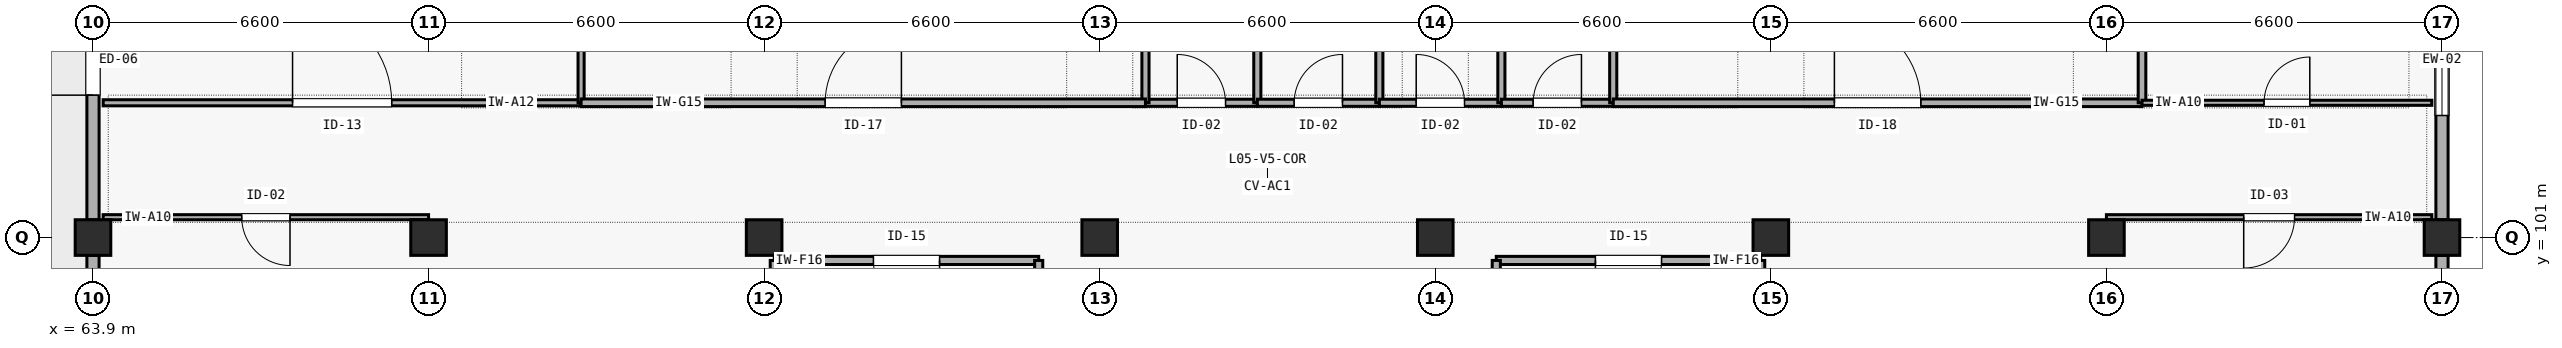
"""IFC4 building model, lengths in metres.
Left out: names, types, materials, properties, quantities, classifications, styles, units other than length and angle.
Written with IfcOpenShell. Run it as: python <this file> out.ifc"""

import sys

from ifc_helpers import new_model, si_unit, direction, frame, frame_2d, origin, origin_2d, place, context, subcontext, project, spatial, rectangle, extrude, element, fill, save


model = new_model("IFC4")
c1 = context("Model", 3, precision=1e-05, world=origin(), true_north=direction((0.0, 1.0)))
c2 = subcontext(c1, "Body", "Model", "MODEL_VIEW")
j1 = project(units=[si_unit("LENGTHUNIT", "METRE"), si_unit("PLANEANGLEUNIT", "RADIAN")], contexts=[c1])
p1 = place(None, origin())
s1 = spatial("IfcSite", under=j1, at=p1, CompositionType="ELEMENT")
p2 = place(p1, origin())
s2 = spatial("IfcBuilding", under=s1, at=p2, CompositionType="ELEMENT")
p3 = place(p2, frame((0.0, 0.0, 21.0)))
s3 = spatial("IfcBuildingStorey", under=s2, at=p3, CompositionType="ELEMENT", Elevation=21.0)
for number, where, z_axis, x_axis in (
    (1, (63.9, 101.0, 0.0), (0.0, 0.0, 1.0), (1.0, 0.0, 0.0)),
    (2, (70.5, 101.0, 0.0), (0.0, 0.0, 1.0), (1.0, 0.0, 0.0)),
    (3, (77.1, 101.0, 0.0), (0.0, 0.0, 1.0), (1.0, 0.0, 0.0)),
    (4, (83.7, 101.0, 0.0), (0.0, 0.0, 1.0), (1.0, 0.0, 0.0)),
    (5, (90.3, 101.0, 0.0), (0.0, 0.0, 1.0), (1.0, 0.0, 0.0)),
    (6, (96.9, 101.0, 0.0), (0.0, 0.0, 1.0), (1.0, 0.0, 0.0)),
    (7, (103.5, 101.0, 0.0), (0.0, 0.0, 1.0), (1.0, 0.0, 0.0)),
    (8, (110.1, 101.0, 0.0), (0.0, 0.0, 1.0), (1.0, 0.0, 0.0)),
):
    element("IfcColumn", number, at=place(p3, frame(where, z_axis=z_axis, x_axis=x_axis)), inside=s3, PredefinedType="COLUMN", context=c2, shape_type="SweptSolid", body=[
        extrude(rectangle(XDim=0.7, YDim=0.7, at=origin_2d()), origin(), (0.0, 0.0, 1.0), 4.2),
    ])
p4 = place(p3, frame((63.9, 94.35, 0.0), z_axis=(0.0, 0.0, 1.0), x_axis=(0.0, 1.0, 0.0)))
e9 = element("IfcWall", 9, at=p4, inside=s3, PredefinedType="SOLIDWALL", context=c2, shape_type="SweptSolid", body=[
    extrude(rectangle(XDim=6.3, YDim=0.24, at=frame_2d((3.15, 0.0))), origin(), (0.0, 0.0, 1.0), 3.505),
])
p5 = place(p4, frame((1.8, 0.0, 0.85)))
e10 = element("IfcOpeningElement", 10, at=p5, cuts=e9, PredefinedType="OPENING", context=c2, shape_type="SweptSolid", body=[
    extrude(rectangle(XDim=2.7, YDim=1.6, at=frame_2d((1.35, 0.8))), frame((0.0, 0.13, 0.0), z_axis=(0.0, -1.0, 0.0), x_axis=(1.0, 0.0, 0.0)), (0.0, 0.0, 1.0), 0.26),
])
p6 = place(p3, frame((63.9, 101.35, 0.0), z_axis=(0.0, 0.0, 1.0), x_axis=(0.0, 1.0, 0.0)))
e11 = element("IfcWall", 11, at=p6, inside=s3, PredefinedType="SOLIDWALL", context=c2, shape_type="SweptSolid", body=[
    extrude(rectangle(XDim=6.3, YDim=0.24, at=frame_2d((3.15, 0.0))), origin(), (0.0, 0.0, 1.0), 3.505),
])
p7 = place(p6, frame((2.45, 0.0, 0.0)))
e12 = element("IfcOpeningElement", 12, at=p7, cuts=e11, PredefinedType="OPENING", context=c2, shape_type="SweptSolid", body=[
    extrude(rectangle(XDim=1.4, YDim=2.15, at=frame_2d((0.7, 1.075))), frame((0.0, 0.13, 0.0), z_axis=(0.0, -1.0, 0.0), x_axis=(1.0, 0.0, 0.0)), (0.0, 0.0, 1.0), 0.26),
])
p8 = place(p3, frame((110.1, 94.35, 0.0), z_axis=(0.0, 0.0, 1.0), x_axis=(0.0, 1.0, 0.0)))
e13 = element("IfcWall", 13, at=p8, inside=s3, PredefinedType="SOLIDWALL", context=c2, shape_type="SweptSolid", body=[
    extrude(rectangle(XDim=6.3, YDim=0.24, at=frame_2d((3.15, 0.0))), origin(), (0.0, 0.0, 1.0), 3.465),
])
p9 = place(p8, frame((2.35, 0.0, 0.85)))
e14 = element("IfcOpeningElement", 14, at=p9, cuts=e13, PredefinedType="OPENING", context=c2, shape_type="SweptSolid", body=[
    extrude(rectangle(XDim=1.6, YDim=1.45, at=frame_2d((0.8, 0.725))), frame((0.0, 0.13, 0.0), z_axis=(0.0, -1.0, 0.0), x_axis=(1.0, 0.0, 0.0)), (0.0, 0.0, 1.0), 0.26),
])
p10 = place(p3, frame((110.1, 101.35, 0.0), z_axis=(0.0, 0.0, 1.0), x_axis=(0.0, 1.0, 0.0)))
e15 = element("IfcWall", 15, at=p10, inside=s3, PredefinedType="SOLIDWALL", context=c2, shape_type="SweptSolid", body=[
    extrude(rectangle(XDim=6.3, YDim=0.24, at=frame_2d((3.15, 0.0))), origin(), (0.0, 0.0, 1.0), 3.465),
])
p11 = place(p10, frame((2.05, 0.0, 0.85)))
e16 = element("IfcOpeningElement", 16, at=p11, cuts=e15, PredefinedType="OPENING", context=c2, shape_type="SweptSolid", body=[
    extrude(rectangle(XDim=2.2, YDim=1.2, at=frame_2d((1.1, 0.6))), frame((0.0, 0.13, 0.0), z_axis=(0.0, -1.0, 0.0), x_axis=(1.0, 0.0, 0.0)), (0.0, 0.0, 1.0), 0.26),
])
p12 = place(p3, frame((77.3, 100.55, 0.0), z_axis=(0.0, 0.0, 1.0), x_axis=(1.0, 0.0, 0.0)))
e17 = element("IfcWall", 17, at=p12, inside=s3, PredefinedType="SOLIDWALL", context=c2, shape_type="SweptSolid", body=[
    extrude(rectangle(XDim=5.2, YDim=0.16, at=frame_2d((2.6, 0.0))), origin(), (0.0, 0.0, 1.0), 3.9),
])
p13 = place(p12, frame((1.95, 0.0, 0.0)))
e18 = element("IfcOpeningElement", 18, at=p13, cuts=e17, PredefinedType="OPENING", context=c2, shape_type="SweptSolid", body=[
    extrude(rectangle(XDim=1.3, YDim=2.15, at=frame_2d((0.65, 1.075))), frame((0.0, 0.09, 0.0), z_axis=(0.0, -1.0, 0.0), x_axis=(1.0, 0.0, 0.0)), (0.0, 0.0, 1.0), 0.18),
])
p14 = place(p3, frame((77.3, 97.5, 0.0), z_axis=(0.0, 0.0, 1.0), x_axis=(0.0, 1.0, 0.0)))
e19 = element("IfcWall", 19, at=p14, inside=s3, PredefinedType="SOLIDWALL", context=c2, shape_type="SweptSolid", body=[
    extrude(rectangle(XDim=3.05, YDim=0.16, at=frame_2d((1.525, 0.0))), origin(), (0.0, 0.0, 1.0), 3.405),
])
p15 = place(p3, frame((82.5, 97.5, 0.0), z_axis=(0.0, 0.0, 1.0), x_axis=(0.0, 1.0, 0.0)))
e20 = element("IfcWall", 20, at=p15, inside=s3, PredefinedType="SOLIDWALL", context=c2, shape_type="SweptSolid", body=[
    extrude(rectangle(XDim=3.05, YDim=0.16, at=frame_2d((1.525, 0.0))), origin(), (0.0, 0.0, 1.0), 3.9),
])
p16 = place(p3, frame((91.5, 100.55, 0.0), z_axis=(0.0, 0.0, 1.0), x_axis=(1.0, 0.0, 0.0)))
e21 = element("IfcWall", 21, at=p16, inside=s3, PredefinedType="SOLIDWALL", context=c2, shape_type="SweptSolid", body=[
    extrude(rectangle(XDim=5.2, YDim=0.16, at=frame_2d((2.6, 0.0))), origin(), (0.0, 0.0, 1.0), 3.9),
])
p17 = place(p16, frame((1.95, 0.0, 0.0)))
e22 = element("IfcOpeningElement", 22, at=p17, cuts=e21, PredefinedType="OPENING", context=c2, shape_type="SweptSolid", body=[
    extrude(rectangle(XDim=1.3, YDim=2.15, at=frame_2d((0.65, 1.075))), frame((0.0, 0.09, 0.0), z_axis=(0.0, -1.0, 0.0), x_axis=(1.0, 0.0, 0.0)), (0.0, 0.0, 1.0), 0.18),
])
p18 = place(p3, frame((91.5, 97.5, 0.0), z_axis=(0.0, 0.0, 1.0), x_axis=(0.0, 1.0, 0.0)))
e23 = element("IfcWall", 23, at=p18, inside=s3, PredefinedType="SOLIDWALL", context=c2, shape_type="SweptSolid", body=[
    extrude(rectangle(XDim=3.05, YDim=0.16, at=frame_2d((1.525, 0.0))), origin(), (0.0, 0.0, 1.0), 3.9),
])
p19 = place(p3, frame((96.7, 97.5, 0.0), z_axis=(0.0, 0.0, 1.0), x_axis=(0.0, 1.0, 0.0)))
e24 = element("IfcWall", 24, at=p19, inside=s3, PredefinedType="SOLIDWALL", context=c2, shape_type="SweptSolid", body=[
    extrude(rectangle(XDim=3.05, YDim=0.16, at=frame_2d((1.525, 0.0))), origin(), (0.0, 0.0, 1.0), 3.405),
])
p20 = place(p3, frame((84.6, 103.65, 0.0), z_axis=(0.0, 0.0, 1.0), x_axis=(1.0, 0.0, 0.0)))
e25 = element("IfcWall", 25, at=p20, inside=s3, PredefinedType="PLUMBINGWALL", context=c2, shape_type="SweptSolid", body=[
    extrude(rectangle(XDim=2.2, YDim=0.14, at=frame_2d((1.1, 0.0))), origin(), (0.0, 0.0, 1.0), 3.9),
])
p21 = place(p20, frame((0.625, 0.0, 0.0)))
e26 = element("IfcOpeningElement", 26, at=p21, cuts=e25, PredefinedType="OPENING", context=c2, shape_type="SweptSolid", body=[
    extrude(rectangle(XDim=0.95, YDim=2.1, at=frame_2d((0.475, 1.05))), frame((0.0, 0.08, 0.0), z_axis=(0.0, -1.0, 0.0), x_axis=(1.0, 0.0, 0.0)), (0.0, 0.0, 1.0), 0.16),
])
for number, where, z_axis, x_axis in (
    (27, (84.6, 103.65, 0.0), (0.0, 0.0, 1.0), (0.0, 1.0, 0.0)),
    (28, (86.8, 103.65, 0.0), (0.0, 0.0, 1.0), (0.0, 1.0, 0.0)),
):
    element("IfcWall", number, at=place(p3, frame(where, z_axis=z_axis, x_axis=x_axis)), inside=s3, PredefinedType="PLUMBINGWALL", context=c2, shape_type="SweptSolid", body=[
        extrude(rectangle(XDim=4.15, YDim=0.14, at=frame_2d((2.075, 0.0))), origin(), (0.0, 0.0, 1.0), 3.9),
    ])
p22 = place(p3, frame((86.8, 103.65, 0.0), z_axis=(0.0, 0.0, 1.0), x_axis=(1.0, 0.0, 0.0)))
e29 = element("IfcWall", 29, at=p22, inside=s3, PredefinedType="PLUMBINGWALL", context=c2, shape_type="SweptSolid", body=[
    extrude(rectangle(XDim=2.4, YDim=0.14, at=frame_2d((1.2, 0.0))), origin(), (0.0, 0.0, 1.0), 3.9),
])
p23 = place(p22, frame((0.725, 0.0, 0.0)))
e30 = element("IfcOpeningElement", 30, at=p23, cuts=e29, PredefinedType="OPENING", context=c2, shape_type="SweptSolid", body=[
    extrude(rectangle(XDim=0.95, YDim=2.1, at=frame_2d((0.475, 1.05))), frame((0.0, 0.08, 0.0), z_axis=(0.0, -1.0, 0.0), x_axis=(1.0, 0.0, 0.0)), (0.0, 0.0, 1.0), 0.16),
])
p24 = place(p3, frame((89.2, 103.65, 0.0), z_axis=(0.0, 0.0, 1.0), x_axis=(0.0, 1.0, 0.0)))
e31 = element("IfcWall", 31, at=p24, inside=s3, PredefinedType="PLUMBINGWALL", context=c2, shape_type="SweptSolid", body=[
    extrude(rectangle(XDim=4.15, YDim=0.14, at=frame_2d((2.075, 0.0))), origin(), (0.0, 0.0, 1.0), 3.9),
])
p25 = place(p3, frame((89.2, 103.65, 0.0), z_axis=(0.0, 0.0, 1.0), x_axis=(1.0, 0.0, 0.0)))
e32 = element("IfcWall", 32, at=p25, inside=s3, PredefinedType="PLUMBINGWALL", context=c2, shape_type="SweptSolid", body=[
    extrude(rectangle(XDim=2.4, YDim=0.14, at=frame_2d((1.2, 0.0))), origin(), (0.0, 0.0, 1.0), 3.9),
])
p26 = place(p25, frame((0.725, 0.0, 0.0)))
e33 = element("IfcOpeningElement", 33, at=p26, cuts=e32, PredefinedType="OPENING", context=c2, shape_type="SweptSolid", body=[
    extrude(rectangle(XDim=0.95, YDim=2.1, at=frame_2d((0.475, 1.05))), frame((0.0, 0.08, 0.0), z_axis=(0.0, -1.0, 0.0), x_axis=(1.0, 0.0, 0.0)), (0.0, 0.0, 1.0), 0.16),
])
p27 = place(p3, frame((91.6, 103.65, 0.0), z_axis=(0.0, 0.0, 1.0), x_axis=(0.0, 1.0, 0.0)))
e34 = element("IfcWall", 34, at=p27, inside=s3, PredefinedType="PLUMBINGWALL", context=c2, shape_type="SweptSolid", body=[
    extrude(rectangle(XDim=4.15, YDim=0.14, at=frame_2d((2.075, 0.0))), origin(), (0.0, 0.0, 1.0), 3.9),
])
p28 = place(p3, frame((91.6, 103.65, 0.0), z_axis=(0.0, 0.0, 1.0), x_axis=(1.0, 0.0, 0.0)))
e35 = element("IfcWall", 35, at=p28, inside=s3, PredefinedType="PLUMBINGWALL", context=c2, shape_type="SweptSolid", body=[
    extrude(rectangle(XDim=2.2, YDim=0.14, at=frame_2d((1.1, 0.0))), origin(), (0.0, 0.0, 1.0), 3.9),
])
p29 = place(p28, frame((0.625, 0.0, 0.0)))
e36 = element("IfcOpeningElement", 36, at=p29, cuts=e35, PredefinedType="OPENING", context=c2, shape_type="SweptSolid", body=[
    extrude(rectangle(XDim=0.95, YDim=2.1, at=frame_2d((0.475, 1.05))), frame((0.0, 0.08, 0.0), z_axis=(0.0, -1.0, 0.0), x_axis=(1.0, 0.0, 0.0)), (0.0, 0.0, 1.0), 0.16),
])
p30 = place(p3, frame((93.8, 103.65, 0.0), z_axis=(0.0, 0.0, 1.0), x_axis=(0.0, 1.0, 0.0)))
e37 = element("IfcWall", 37, at=p30, inside=s3, PredefinedType="PLUMBINGWALL", context=c2, shape_type="SweptSolid", body=[
    extrude(rectangle(XDim=4.15, YDim=0.14, at=frame_2d((2.075, 0.0))), origin(), (0.0, 0.0, 1.0), 3.9),
])
p31 = place(p3, frame((64.1, 103.65, 0.0), z_axis=(0.0, 0.0, 1.0), x_axis=(1.0, 0.0, 0.0)))
e38 = element("IfcWall", 38, at=p31, inside=s3, PredefinedType="PARTITIONING", context=c2, shape_type="SweptSolid", body=[
    extrude(rectangle(XDim=9.4, YDim=0.12, at=frame_2d((4.7, 0.0))), origin(), (0.0, 0.0, 1.0), 3.9),
])
p32 = place(p31, frame((3.725, 0.0, 0.0)))
e39 = element("IfcOpeningElement", 39, at=p32, cuts=e38, PredefinedType="OPENING", context=c2, shape_type="SweptSolid", body=[
    extrude(rectangle(XDim=1.95, YDim=2.3, at=frame_2d((0.975, 1.15))), frame((0.0, 0.07, 0.0), z_axis=(0.0, -1.0, 0.0), x_axis=(1.0, 0.0, 0.0)), (0.0, 0.0, 1.0), 0.14),
])
p33 = place(p3, frame((73.5, 103.65, 0.0), z_axis=(0.0, 0.0, 1.0), x_axis=(0.0, 1.0, 0.0)))
e40 = element("IfcWall", 40, at=p33, inside=s3, PredefinedType="PARTITIONING", context=c2, shape_type="SweptSolid", body=[
    extrude(rectangle(XDim=11.15, YDim=0.12, at=frame_2d((5.575, 0.0))), origin(), (0.0, 0.0, 1.0), 3.9),
])
p34 = place(p3, frame((73.5, 103.65, 0.0), z_axis=(0.0, 0.0, 1.0), x_axis=(1.0, 0.0, 0.0)))
e41 = element("IfcWall", 41, at=p34, inside=s3, PredefinedType="PARTITIONING", context=c2, shape_type="SweptSolid", body=[
    extrude(rectangle(XDim=11.1, YDim=0.15, at=frame_2d((5.55, 0.0))), origin(), (0.0, 0.0, 1.0), 3.9),
])
p35 = place(p34, frame((4.8, 0.0, 0.0)))
e42 = element("IfcOpeningElement", 42, at=p35, cuts=e41, PredefinedType="OPENING", context=c2, shape_type="SweptSolid", body=[
    extrude(rectangle(XDim=1.5, YDim=2.15, at=frame_2d((0.75, 1.075))), frame((0.0, 0.085, 0.0), z_axis=(0.0, -1.0, 0.0), x_axis=(1.0, 0.0, 0.0)), (0.0, 0.0, 1.0), 0.17),
])
p36 = place(p3, frame((93.8, 103.65, 0.0), z_axis=(0.0, 0.0, 1.0), x_axis=(1.0, 0.0, 0.0)))
e43 = element("IfcWall", 43, at=p36, inside=s3, PredefinedType="PARTITIONING", context=c2, shape_type="SweptSolid", body=[
    extrude(rectangle(XDim=10.4, YDim=0.15, at=frame_2d((5.2, 0.0))), origin(), (0.0, 0.0, 1.0), 3.9),
])
p37 = place(p36, frame((4.35, 0.0, 0.0)))
e44 = element("IfcOpeningElement", 44, at=p37, cuts=e43, PredefinedType="OPENING", context=c2, shape_type="SweptSolid", body=[
    extrude(rectangle(XDim=1.7, YDim=2.2, at=frame_2d((0.85, 1.1))), frame((0.0, 0.085, 0.0), z_axis=(0.0, -1.0, 0.0), x_axis=(1.0, 0.0, 0.0)), (0.0, 0.0, 1.0), 0.17),
])
p38 = place(p3, frame((104.2, 103.65, 0.0), z_axis=(0.0, 0.0, 1.0), x_axis=(0.0, 1.0, 0.0)))
e45 = element("IfcWall", 45, at=p38, inside=s3, PredefinedType="PARTITIONING", context=c2, shape_type="SweptSolid", body=[
    extrude(rectangle(XDim=11.15, YDim=0.15, at=frame_2d((5.575, 0.0))), origin(), (0.0, 0.0, 1.0), 3.9),
])
p39 = place(p3, frame((104.2, 103.65, 0.0), z_axis=(0.0, 0.0, 1.0), x_axis=(1.0, 0.0, 0.0)))
e46 = element("IfcWall", 46, at=p39, inside=s3, PredefinedType="PARTITIONING", context=c2, shape_type="SweptSolid", body=[
    extrude(rectangle(XDim=5.7, YDim=0.1, at=frame_2d((2.85, 0.0))), origin(), (0.0, 0.0, 1.0), 3.9),
])
p40 = place(p39, frame((2.4, 0.0, 0.0)))
e47 = element("IfcOpeningElement", 47, at=p40, cuts=e46, PredefinedType="OPENING", context=c2, shape_type="SweptSolid", body=[
    extrude(rectangle(XDim=0.9, YDim=2.1, at=frame_2d((0.45, 1.05))), frame((0.0, 0.06, 0.0), z_axis=(0.0, -1.0, 0.0), x_axis=(1.0, 0.0, 0.0)), (0.0, 0.0, 1.0), 0.12),
])
p41 = place(p3, frame((64.1, 101.4, 0.0), z_axis=(0.0, 0.0, 1.0), x_axis=(1.0, 0.0, 0.0)))
e48 = element("IfcWall", 48, at=p41, inside=s3, PredefinedType="PARTITIONING", context=c2, shape_type="SweptSolid", body=[
    extrude(rectangle(XDim=6.4, YDim=0.1, at=frame_2d((3.2, 0.0))), origin(), (0.0, 0.0, 1.0), 3.9),
])
p42 = place(p41, frame((2.725, 0.0, 0.0)))
e49 = element("IfcOpeningElement", 49, at=p42, cuts=e48, PredefinedType="OPENING", context=c2, shape_type="SweptSolid", body=[
    extrude(rectangle(XDim=0.95, YDim=2.1, at=frame_2d((0.475, 1.05))), frame((0.0, 0.06, 0.0), z_axis=(0.0, -1.0, 0.0), x_axis=(1.0, 0.0, 0.0)), (0.0, 0.0, 1.0), 0.12),
])
p43 = place(p3, frame((103.5, 101.4, 0.0), z_axis=(0.0, 0.0, 1.0), x_axis=(1.0, 0.0, 0.0)))
e50 = element("IfcWall", 50, at=p43, inside=s3, PredefinedType="PARTITIONING", context=c2, shape_type="SweptSolid", body=[
    extrude(rectangle(XDim=6.4, YDim=0.1, at=frame_2d((3.2, 0.0))), origin(), (0.0, 0.0, 1.0), 3.9),
])
p44 = place(p43, frame((2.7, 0.0, 0.0)))
e51 = element("IfcOpeningElement", 51, at=p44, cuts=e50, PredefinedType="OPENING", context=c2, shape_type="SweptSolid", body=[
    extrude(rectangle(XDim=1.0, YDim=2.1, at=frame_2d((0.5, 1.05))), frame((0.0, 0.06, 0.0), z_axis=(0.0, -1.0, 0.0), x_axis=(1.0, 0.0, 0.0)), (0.0, 0.0, 1.0), 0.12),
])
p45 = place(p7, origin())
e52 = element("IfcDoor", 52, at=p45, inside=s3, OperationType="SINGLE_SWING_LEFT", PredefinedType="DOOR", context=c2, shape_type="SweptSolid", body=[
    extrude(rectangle(XDim=1.4, YDim=2.15, at=frame_2d((0.7, 1.075))), frame((0.0, 0.025, 0.0), z_axis=(0.0, -1.0, 0.0), x_axis=(1.0, 0.0, 0.0)), (0.0, 0.0, 1.0), 0.05),
])
fill(e12, e52)
p46 = place(p11, origin())
e53 = element("IfcWindow", 53, at=p46, inside=s3, PartitioningType="SINGLE_PANEL", PredefinedType="WINDOW", context=c2, shape_type="SweptSolid", body=[
    extrude(rectangle(XDim=2.2, YDim=1.2, at=frame_2d((1.1, 0.6))), frame((0.0, 0.03, 0.0), z_axis=(0.0, -1.0, 0.0), x_axis=(1.0, 0.0, 0.0)), (0.0, 0.0, 1.0), 0.06),
])
fill(e16, e53)
p47 = place(p13, frame((1.3, 0.0, 0.0), z_axis=(0.0, 0.0, 1.0), x_axis=(-1.0, 0.0, 0.0)))
e54 = element("IfcDoor", 54, at=p47, inside=s3, OperationType="SINGLE_SWING_LEFT", PredefinedType="DOOR", context=c2, shape_type="SweptSolid", body=[
    extrude(rectangle(XDim=1.3, YDim=2.15, at=frame_2d((0.65, 1.075))), frame((0.0, 0.025, 0.0), z_axis=(0.0, -1.0, 0.0), x_axis=(1.0, 0.0, 0.0)), (0.0, 0.0, 1.0), 0.05),
])
fill(e18, e54)
p48 = place(p17, frame((1.3, 0.0, 0.0), z_axis=(0.0, 0.0, 1.0), x_axis=(-1.0, 0.0, 0.0)))
e55 = element("IfcDoor", 55, at=p48, inside=s3, OperationType="SINGLE_SWING_RIGHT", PredefinedType="DOOR", context=c2, shape_type="SweptSolid", body=[
    extrude(rectangle(XDim=1.3, YDim=2.15, at=frame_2d((0.65, 1.075))), frame((0.0, 0.025, 0.0), z_axis=(0.0, -1.0, 0.0), x_axis=(1.0, 0.0, 0.0)), (0.0, 0.0, 1.0), 0.05),
])
fill(e22, e55)
p49 = place(p21, origin())
e56 = element("IfcDoor", 56, at=p49, inside=s3, OperationType="SINGLE_SWING_LEFT", PredefinedType="DOOR", context=c2, shape_type="SweptSolid", body=[
    extrude(rectangle(XDim=0.95, YDim=2.1, at=frame_2d((0.475, 1.05))), frame((0.0, 0.025, 0.0), z_axis=(0.0, -1.0, 0.0), x_axis=(1.0, 0.0, 0.0)), (0.0, 0.0, 1.0), 0.05),
])
fill(e26, e56)
p50 = place(p23, origin())
e57 = element("IfcDoor", 57, at=p50, inside=s3, OperationType="SINGLE_SWING_RIGHT", PredefinedType="DOOR", context=c2, shape_type="SweptSolid", body=[
    extrude(rectangle(XDim=0.95, YDim=2.1, at=frame_2d((0.475, 1.05))), frame((0.0, 0.025, 0.0), z_axis=(0.0, -1.0, 0.0), x_axis=(1.0, 0.0, 0.0)), (0.0, 0.0, 1.0), 0.05),
])
fill(e30, e57)
p51 = place(p26, origin())
e58 = element("IfcDoor", 58, at=p51, inside=s3, OperationType="SINGLE_SWING_LEFT", PredefinedType="DOOR", context=c2, shape_type="SweptSolid", body=[
    extrude(rectangle(XDim=0.95, YDim=2.1, at=frame_2d((0.475, 1.05))), frame((0.0, 0.025, 0.0), z_axis=(0.0, -1.0, 0.0), x_axis=(1.0, 0.0, 0.0)), (0.0, 0.0, 1.0), 0.05),
])
fill(e33, e58)
p52 = place(p29, origin())
e59 = element("IfcDoor", 59, at=p52, inside=s3, OperationType="SINGLE_SWING_RIGHT", PredefinedType="DOOR", context=c2, shape_type="SweptSolid", body=[
    extrude(rectangle(XDim=0.95, YDim=2.1, at=frame_2d((0.475, 1.05))), frame((0.0, 0.025, 0.0), z_axis=(0.0, -1.0, 0.0), x_axis=(1.0, 0.0, 0.0)), (0.0, 0.0, 1.0), 0.05),
])
fill(e36, e59)
p53 = place(p32, origin())
e60 = element("IfcDoor", 60, at=p53, inside=s3, OperationType="SINGLE_SWING_LEFT", PredefinedType="DOOR", context=c2, shape_type="SweptSolid", body=[
    extrude(rectangle(XDim=1.95, YDim=2.3, at=frame_2d((0.975, 1.15))), frame((0.0, 0.025, 0.0), z_axis=(0.0, -1.0, 0.0), x_axis=(1.0, 0.0, 0.0)), (0.0, 0.0, 1.0), 0.05),
])
fill(e39, e60)
p54 = place(p35, origin())
e61 = element("IfcDoor", 61, at=p54, inside=s3, OperationType="SINGLE_SWING_RIGHT", PredefinedType="DOOR", context=c2, shape_type="SweptSolid", body=[
    extrude(rectangle(XDim=1.5, YDim=2.15, at=frame_2d((0.75, 1.075))), frame((0.0, 0.025, 0.0), z_axis=(0.0, -1.0, 0.0), x_axis=(1.0, 0.0, 0.0)), (0.0, 0.0, 1.0), 0.05),
])
fill(e42, e61)
p55 = place(p37, origin())
e62 = element("IfcDoor", 62, at=p55, inside=s3, OperationType="SINGLE_SWING_LEFT", PredefinedType="DOOR", context=c2, shape_type="SweptSolid", body=[
    extrude(rectangle(XDim=1.7, YDim=2.2, at=frame_2d((0.85, 1.1))), frame((0.0, 0.025, 0.0), z_axis=(0.0, -1.0, 0.0), x_axis=(1.0, 0.0, 0.0)), (0.0, 0.0, 1.0), 0.05),
])
fill(e44, e62)
p56 = place(p40, origin())
e63 = element("IfcDoor", 63, at=p56, inside=s3, OperationType="SINGLE_SWING_RIGHT", PredefinedType="DOOR", context=c2, shape_type="SweptSolid", body=[
    extrude(rectangle(XDim=0.9, YDim=2.1, at=frame_2d((0.45, 1.05))), frame((0.0, 0.025, 0.0), z_axis=(0.0, -1.0, 0.0), x_axis=(1.0, 0.0, 0.0)), (0.0, 0.0, 1.0), 0.05),
])
fill(e47, e63)
p57 = place(p42, frame((0.95, 0.0, 0.0), z_axis=(0.0, 0.0, 1.0), x_axis=(-1.0, 0.0, 0.0)))
e64 = element("IfcDoor", 64, at=p57, inside=s3, OperationType="SINGLE_SWING_LEFT", PredefinedType="DOOR", context=c2, shape_type="SweptSolid", body=[
    extrude(rectangle(XDim=0.95, YDim=2.1, at=frame_2d((0.475, 1.05))), frame((0.0, 0.025, 0.0), z_axis=(0.0, -1.0, 0.0), x_axis=(1.0, 0.0, 0.0)), (0.0, 0.0, 1.0), 0.05),
])
fill(e49, e64)
p58 = place(p44, frame((1.0, 0.0, 0.0), z_axis=(0.0, 0.0, 1.0), x_axis=(-1.0, 0.0, 0.0)))
e65 = element("IfcDoor", 65, at=p58, inside=s3, OperationType="SINGLE_SWING_RIGHT", PredefinedType="DOOR", context=c2, shape_type="SweptSolid", body=[
    extrude(rectangle(XDim=1.0, YDim=2.1, at=frame_2d((0.5, 1.05))), frame((0.0, 0.025, 0.0), z_axis=(0.0, -1.0, 0.0), x_axis=(1.0, 0.0, 0.0)), (0.0, 0.0, 1.0), 0.05),
])
fill(e51, e65)
save(model, sys.argv[1])
